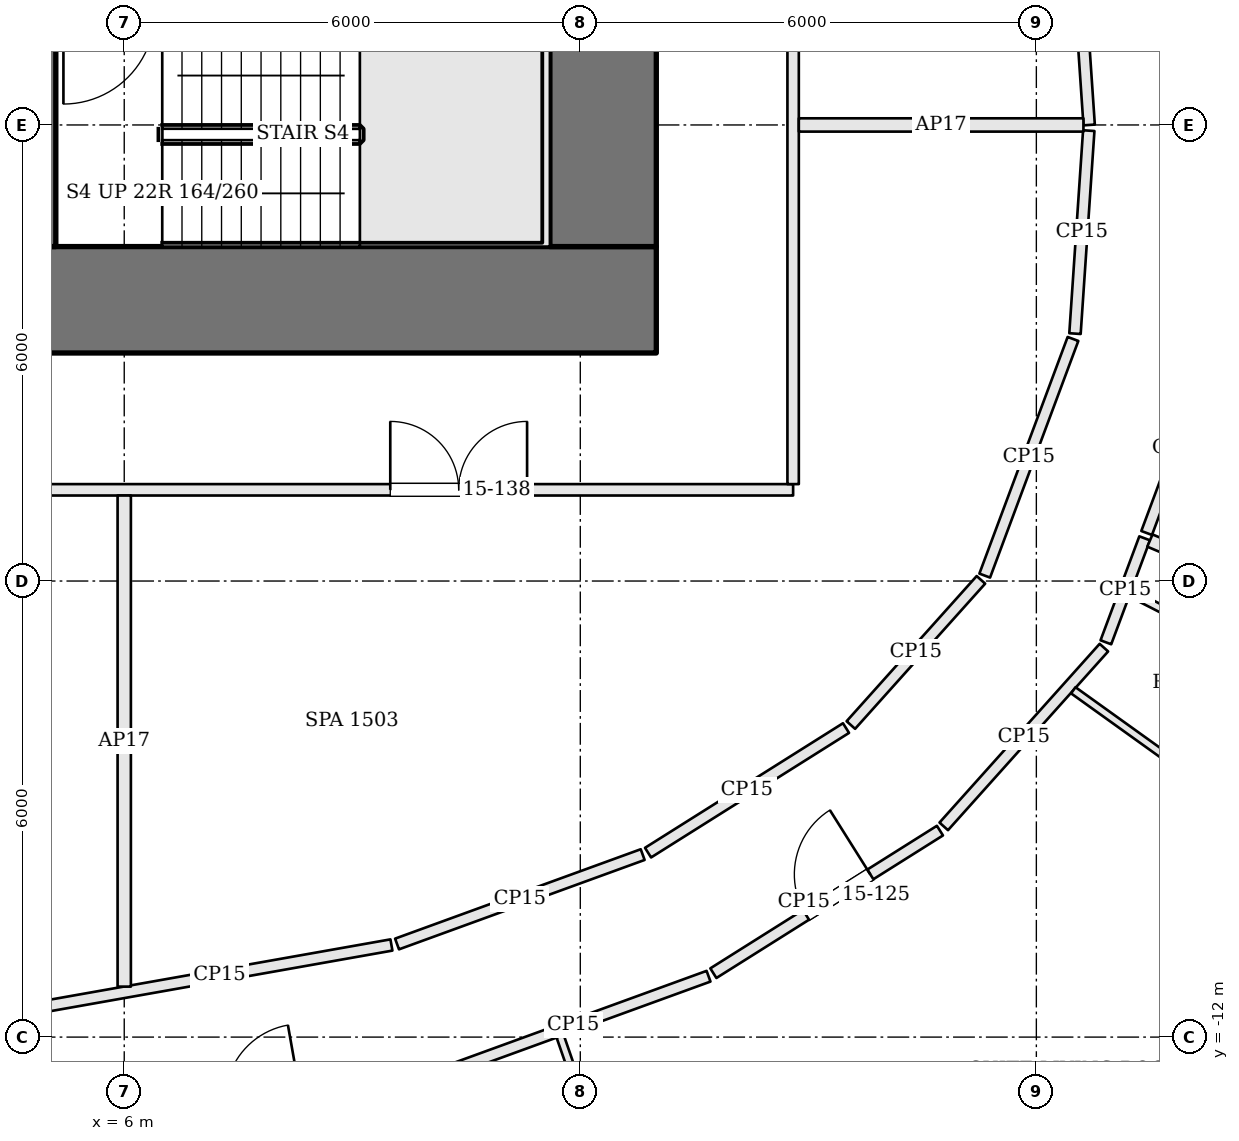
"""IFC4 building model, lengths in metres.
Left out: names, types, materials, properties, quantities, classifications, styles, units other than length and angle.
Written with IfcOpenShell. Run it as: python <this file> out.ifc"""

import sys

from ifc_helpers import new_model, si_unit, direction, frame, frame_2d, origin, place, context, subcontext, project, spatial, rectangle, extrude, element, fill, save


model = new_model("IFC4")
c1 = context("Model", 3, precision=1e-05, world=origin(), true_north=direction((0.0, 1.0)))
c2 = subcontext(c1, "Body", "Model", "MODEL_VIEW")
j1 = project(units=[si_unit("LENGTHUNIT", "METRE"), si_unit("PLANEANGLEUNIT", "RADIAN")], contexts=[c1])
p1 = place(None, origin())
s1 = spatial("IfcSite", under=j1, at=p1, CompositionType="ELEMENT")
p2 = place(p1, origin())
s2 = spatial("IfcBuilding", under=s1, at=p2, CompositionType="ELEMENT")
p3 = place(p2, frame((0.0, 0.0, 69.9)))
s3 = spatial("IfcBuildingStorey", under=s2, at=p3, CompositionType="ELEMENT", Elevation=69.9)
p4 = place(p3, frame((-13.0, -2.3, 0.0), z_axis=(0.0, 0.0, 1.0), x_axis=(1.0, 0.0, 0.0)))
e1 = element("IfcWall", 1, at=p4, inside=s3, PredefinedType="SHEAR", context=c2, shape_type="SweptSolid", body=[
    extrude(rectangle(XDim=26.0, YDim=1.4, at=frame_2d((13.0, 0.0))), origin(), (0.0, 0.0, 1.0), 3.6),
])
p5 = place(p4, frame((8.825, 0.0, 0.0)))
e2 = element("IfcOpeningElement", 2, at=p5, cuts=e1, PredefinedType="OPENING", context=c2, shape_type="SweptSolid", body=[
    extrude(rectangle(XDim=1.0, YDim=2.1, at=frame_2d((0.5, 1.05))), frame((0.0, 0.71, 0.0), z_axis=(0.0, -1.0, 0.0), x_axis=(1.0, 0.0, 0.0)), (0.0, 0.0, 1.0), 1.42),
])
p6 = place(p4, frame((11.025, 0.0, 0.0)))
e3 = element("IfcOpeningElement", 3, at=p6, cuts=e1, PredefinedType="OPENING", context=c2, shape_type="SweptSolid", body=[
    extrude(rectangle(XDim=0.7, YDim=2.1, at=frame_2d((0.35, 1.05))), frame((0.0, 0.71, 0.0), z_axis=(0.0, -1.0, 0.0), x_axis=(1.0, 0.0, 0.0)), (0.0, 0.0, 1.0), 1.42),
])
p7 = place(p4, frame((12.925, 0.0, 0.0)))
e4 = element("IfcOpeningElement", 4, at=p7, cuts=e1, PredefinedType="OPENING", context=c2, shape_type="SweptSolid", body=[
    extrude(rectangle(XDim=1.0, YDim=2.1, at=frame_2d((0.5, 1.05))), frame((0.0, 0.71, 0.0), z_axis=(0.0, -1.0, 0.0), x_axis=(1.0, 0.0, 0.0)), (0.0, 0.0, 1.0), 1.42),
])
p8 = place(p4, frame((15.775, 0.0, 0.0)))
e5 = element("IfcOpeningElement", 5, at=p8, cuts=e1, PredefinedType="OPENING", context=c2, shape_type="SweptSolid", body=[
    extrude(rectangle(XDim=1.0, YDim=2.1, at=frame_2d((0.5, 1.05))), frame((0.0, 0.71, 0.0), z_axis=(0.0, -1.0, 0.0), x_axis=(1.0, 0.0, 0.0)), (0.0, 0.0, 1.0), 1.42),
])
p9 = place(p3, frame((12.3, -1.6, 0.0), z_axis=(0.0, 0.0, 1.0), x_axis=(0.0, 1.0, 0.0)))
e6 = element("IfcWall", 6, at=p9, inside=s3, PredefinedType="SHEAR", context=c2, shape_type="SweptSolid", body=[
    extrude(rectangle(XDim=12.2, YDim=1.4, at=frame_2d((6.1, 0.0))), origin(), (0.0, 0.0, 1.0), 3.6),
])
p10 = place(p9, frame((6.8, 0.0, 0.0)))
e7 = element("IfcOpeningElement", 7, at=p10, cuts=e6, PredefinedType="OPENING", context=c2, shape_type="SweptSolid", body=[
    extrude(rectangle(XDim=1.8, YDim=2.1, at=frame_2d((0.9, 1.05))), frame((0.0, 0.71, 0.0), z_axis=(0.0, -1.0, 0.0), x_axis=(1.0, 0.0, 0.0)), (0.0, 0.0, 1.0), 1.42),
])
p11 = place(p3, frame((4.975, 10.6, 0.0), z_axis=(0.0, 0.0, 1.0), x_axis=(0.0, -1.0, 0.0)))
e8 = element("IfcWall", 8, at=p11, inside=s3, PredefinedType="SOLIDWALL", context=c2, shape_type="SweptSolid", body=[
    extrude(rectangle(XDim=12.2, YDim=0.25, at=frame_2d((6.1, 0.0))), origin(), (0.0, 0.0, 1.0), 3.4),
])
p12 = place(p11, frame((4.65, 0.0, 0.0)))
e9 = element("IfcOpeningElement", 9, at=p12, cuts=e8, PredefinedType="OPENING", context=c2, shape_type="SweptSolid", body=[
    extrude(rectangle(XDim=1.2, YDim=2.1, at=frame_2d((0.6, 1.05))), frame((0.0, 0.135, 0.0), z_axis=(0.0, -1.0, 0.0), x_axis=(1.0, 0.0, 0.0)), (0.0, 0.0, 1.0), 0.27),
])
p13 = place(p3, frame((10.128, -12.494, 0.0), z_axis=(0.0, 0.0, 1.0), x_axis=(0.939720005412, 0.341944895309, 0.0)))
e10 = element("IfcWall", 10, at=p13, inside=s3, PredefinedType="PARTITIONING", context=c2, shape_type="SweptSolid", body=[
    extrude(rectangle(XDim=3.788, YDim=0.15, at=frame_2d((1.894, 0.0))), origin(), (0.0, 0.0, 1.0), 2.68),
])
p14 = place(p3, frame((13.751, -11.159, 0.0), z_axis=(0.0, 0.0, 1.0), x_axis=(0.846413381026, 0.532526420396, 0.0)))
e11 = element("IfcWall", 11, at=p14, inside=s3, PredefinedType="PARTITIONING", context=c2, shape_type="SweptSolid", body=[
    extrude(rectangle(XDim=3.522, YDim=0.15, at=frame_2d((1.761, 0.0))), origin(), (0.0, 0.0, 1.0), 2.68),
])
p15 = place(p14, frame((1.44, 0.0, 0.0)))
e12 = element("IfcOpeningElement", 12, at=p15, cuts=e11, PredefinedType="OPENING", context=c2, shape_type="SweptSolid", body=[
    extrude(rectangle(XDim=1.0, YDim=2.1, at=frame_2d((0.5, 1.05))), frame((0.0, 0.085, 0.0), z_axis=(0.0, -1.0, 0.0), x_axis=(1.0, 0.0, 0.0)), (0.0, 0.0, 1.0), 0.17),
])
p16 = place(p3, frame((16.781, -9.228, 0.0), z_axis=(0.0, 0.0, 1.0), x_axis=(0.667305516611, 0.744784094554, 0.0)))
e13 = element("IfcWall", 13, at=p16, inside=s3, PredefinedType="PARTITIONING", context=c2, shape_type="SweptSolid", body=[
    extrude(rectangle(XDim=3.157, YDim=0.15, at=frame_2d((1.579, 0.0))), origin(), (0.0, 0.0, 1.0), 2.68),
])
p17 = place(p3, frame((18.915, -6.806, 0.0), z_axis=(0.0, 0.0, 1.0), x_axis=(0.349345122546, 0.936994122368, 0.0)))
e14 = element("IfcWall", 14, at=p17, inside=s3, PredefinedType="PARTITIONING", context=c2, shape_type="SweptSolid", body=[
    extrude(rectangle(XDim=1.46, YDim=0.15, at=frame_2d((0.73, 0.0))), origin(), (0.0, 0.0, 1.0), 2.68),
])
p18 = place(p3, frame((29.139, -9.557, 0.0), z_axis=(0.0, 0.0, 1.0), x_axis=(-0.920644988054, 0.390400827318, 0.0)))
e15 = element("IfcWall", 15, at=p18, inside=s3, PredefinedType="PARTITIONING", context=c2, shape_type="SweptSolid", body=[
    extrude(rectangle(XDim=10.477, YDim=0.175, at=frame_2d((5.238, 0.0))), origin(), (0.0, 0.0, 1.0), 2.68),
])
p19 = place(p3, frame((19.451, -5.368, 0.0), z_axis=(0.0, 0.0, 1.0), x_axis=(0.349432605922, 0.936961500766, 0.0)))
e16 = element("IfcWall", 16, at=p19, inside=s3, PredefinedType="PARTITIONING", context=c2, shape_type="SweptSolid", body=[
    extrude(rectangle(XDim=2.39, YDim=0.15, at=frame_2d((1.195, 0.0))), origin(), (0.0, 0.0, 1.0), 2.68),
])
p20 = place(p3, frame((18.508, 2.742, 0.0), z_axis=(0.0, 0.0, 1.0), x_axis=(0.067774714774, -0.997700650515, 0.0)))
e17 = element("IfcWall", 17, at=p20, inside=s3, PredefinedType="PARTITIONING", context=c2, shape_type="SweptSolid", body=[
    extrude(rectangle(XDim=2.749, YDim=0.15, at=frame_2d((1.374, 0.0))), origin(), (0.0, 0.0, 1.0), 2.68),
])
p21 = place(p3, frame((18.689, -0.075, 0.0), z_axis=(0.0, 0.0, 1.0), x_axis=(-0.067687508044, -0.997706570718, 0.0)))
e18 = element("IfcWall", 18, at=p21, inside=s3, PredefinedType="PARTITIONING", context=c2, shape_type="SweptSolid", body=[
    extrude(rectangle(XDim=2.676, YDim=0.15, at=frame_2d((1.338, 0.0))), origin(), (0.0, 0.0, 1.0), 2.68),
])
p22 = place(p3, frame((18.482, -2.815, 0.0), z_axis=(0.0, 0.0, 1.0), x_axis=(-0.349448047934, -0.936955741642, 0.0)))
e19 = element("IfcWall", 19, at=p22, inside=s3, PredefinedType="PARTITIONING", context=c2, shape_type="SweptSolid", body=[
    extrude(rectangle(XDim=3.323, YDim=0.15, at=frame_2d((1.661, 0.0))), origin(), (0.0, 0.0, 1.0), 2.68),
])
p23 = place(p3, frame((17.271, -5.984, 0.0), z_axis=(0.0, 0.0, 1.0), x_axis=(-0.667301130907, -0.744788023997, 0.0)))
e20 = element("IfcWall", 20, at=p23, inside=s3, PredefinedType="PARTITIONING", context=c2, shape_type="SweptSolid", body=[
    extrude(rectangle(XDim=2.565, YDim=0.15, at=frame_2d((1.282, 0.0))), origin(), (0.0, 0.0, 1.0), 2.68),
])
p24 = place(p3, frame((15.496, -7.934, 0.0), z_axis=(0.0, 0.0, 1.0), x_axis=(-0.846358667139, -0.532613374371, 0.0)))
e21 = element("IfcWall", 21, at=p24, inside=s3, PredefinedType="PARTITIONING", context=c2, shape_type="SweptSolid", body=[
    extrude(rectangle(XDim=3.078, YDim=0.15, at=frame_2d((1.539, 0.0))), origin(), (0.0, 0.0, 1.0), 2.68),
])
p25 = place(p3, frame((12.821, -9.599, 0.0), z_axis=(0.0, 0.0, 1.0), x_axis=(-0.939712560326, -0.341965354921, 0.0)))
e22 = element("IfcWall", 22, at=p25, inside=s3, PredefinedType="PARTITIONING", context=c2, shape_type="SweptSolid", body=[
    extrude(rectangle(XDim=3.439, YDim=0.15, at=frame_2d((1.719, 0.0))), origin(), (0.0, 0.0, 1.0), 2.68),
])
p26 = place(p3, frame((9.515, -10.788, 0.0), z_axis=(0.0, 0.0, 1.0), x_axis=(-0.984662912103, -0.174467617423, 0.0)))
e23 = element("IfcWall", 23, at=p26, inside=s3, PredefinedType="PARTITIONING", context=c2, shape_type="SweptSolid", body=[
    extrude(rectangle(XDim=4.593, YDim=0.15, at=frame_2d((2.296, 0.0))), origin(), (0.0, 0.0, 1.0), 2.68),
])
p27 = place(p3, frame((-14.725, -4.8, 0.0), z_axis=(0.0, 0.0, 1.0), x_axis=(1.0, 0.0, 0.0)))
e24 = element("IfcWall", 24, at=p27, inside=s3, PredefinedType="PARTITIONING", context=c2, shape_type="SweptSolid", body=[
    extrude(rectangle(XDim=29.525, YDim=0.15, at=frame_2d((14.763, 0.0))), origin(), (0.0, 0.0, 1.0), 2.68),
])
p28 = place(p27, frame((3.425, 0.0, 0.0)))
e25 = element("IfcOpeningElement", 25, at=p28, cuts=e24, PredefinedType="OPENING", context=c2, shape_type="SweptSolid", body=[
    extrude(rectangle(XDim=1.8, YDim=2.1, at=frame_2d((0.9, 1.05))), frame((0.0, 0.085, 0.0), z_axis=(0.0, -1.0, 0.0), x_axis=(1.0, 0.0, 0.0)), (0.0, 0.0, 1.0), 0.17),
])
p29 = place(p27, frame((13.825, 0.0, 0.0)))
e26 = element("IfcOpeningElement", 26, at=p29, cuts=e24, PredefinedType="OPENING", context=c2, shape_type="SweptSolid", body=[
    extrude(rectangle(XDim=1.8, YDim=2.1, at=frame_2d((0.9, 1.05))), frame((0.0, 0.085, 0.0), z_axis=(0.0, -1.0, 0.0), x_axis=(1.0, 0.0, 0.0)), (0.0, 0.0, 1.0), 0.17),
])
p30 = place(p27, frame((24.225, 0.0, 0.0)))
e27 = element("IfcOpeningElement", 27, at=p30, cuts=e24, PredefinedType="OPENING", context=c2, shape_type="SweptSolid", body=[
    extrude(rectangle(XDim=1.8, YDim=2.1, at=frame_2d((0.9, 1.05))), frame((0.0, 0.085, 0.0), z_axis=(0.0, -1.0, 0.0), x_axis=(1.0, 0.0, 0.0)), (0.0, 0.0, 1.0), 0.17),
])
p31 = place(p3, frame((14.8, -4.725, 0.0), z_axis=(0.0, 0.0, 1.0), x_axis=(0.0, 1.0, 0.0)))
e28 = element("IfcWall", 28, at=p31, inside=s3, PredefinedType="PARTITIONING", context=c2, shape_type="SweptSolid", body=[
    extrude(rectangle(XDim=13.15, YDim=0.15, at=frame_2d((6.575, 0.0))), origin(), (0.0, 0.0, 1.0), 2.68),
])
p32 = place(p31, frame((8.438, 0.0, 0.0)))
e29 = element("IfcOpeningElement", 29, at=p32, cuts=e28, PredefinedType="OPENING", context=c2, shape_type="SweptSolid", body=[
    extrude(rectangle(XDim=1.0, YDim=2.1, at=frame_2d((0.5, 1.05))), frame((0.0, 0.085, 0.0), z_axis=(0.0, -1.0, 0.0), x_axis=(1.0, 0.0, 0.0)), (0.0, 0.0, 1.0), 0.17),
])
p33 = place(p3, frame((14.603, -20.272, 0.0), z_axis=(0.0, 0.0, 1.0), x_axis=(-0.327253103395, 0.944936720801, 0.0)))
e30 = element("IfcWall", 30, at=p33, inside=s3, PredefinedType="PARTITIONING", context=c2, shape_type="SweptSolid", body=[
    extrude(rectangle(XDim=8.765, YDim=0.1, at=frame_2d((4.383, 0.0))), origin(), (0.0, 0.0, 1.0), 2.898),
])
p34 = place(p33, frame((4.69, 0.0, 0.0)))
e31 = element("IfcOpeningElement", 31, at=p34, cuts=e30, PredefinedType="OPENING", context=c2, shape_type="SweptSolid", body=[
    extrude(rectangle(XDim=0.9, YDim=2.4, at=frame_2d((0.45, 1.2))), frame((0.0, 0.06, 0.0), z_axis=(0.0, -1.0, 0.0), x_axis=(1.0, 0.0, 0.0)), (0.0, 0.0, 1.0), 0.12),
])
p35 = place(p3, frame((27.033, -13.565, 0.0), z_axis=(0.0, 0.0, 1.0), x_axis=(-0.812696934536, 0.582686616112, 0.0)))
e32 = element("IfcWall", 32, at=p35, inside=s3, PredefinedType="PARTITIONING", context=c2, shape_type="SweptSolid", body=[
    extrude(rectangle(XDim=10.517, YDim=0.1, at=frame_2d((5.258, 0.0))), origin(), (0.0, 0.0, 1.0), 2.898),
])
p36 = place(p35, frame((6.442, 0.0, 0.0)))
e33 = element("IfcOpeningElement", 33, at=p36, cuts=e32, PredefinedType="OPENING", context=c2, shape_type="SweptSolid", body=[
    extrude(rectangle(XDim=0.9, YDim=2.4, at=frame_2d((0.45, 1.2))), frame((0.0, 0.06, 0.0), z_axis=(0.0, -1.0, 0.0), x_axis=(1.0, 0.0, 0.0)), (0.0, 0.0, 1.0), 0.12),
])
p37 = place(p3, frame((19.237, -6.156, 0.0), z_axis=(0.0, 0.0, 1.0), x_axis=(0.890073027503, -0.455817952379, 0.0)))
e34 = element("IfcWall", 34, at=p37, inside=s3, PredefinedType="PARTITIONING", context=c2, shape_type="SweptSolid", body=[
    extrude(rectangle(XDim=2.525, YDim=0.1, at=frame_2d((1.262, 0.0))), origin(), (0.0, 0.0, 1.0), 2.898),
])
p38 = place(p37, frame((1.2, 0.0, 0.0)))
e35 = element("IfcOpeningElement", 35, at=p38, cuts=e34, PredefinedType="OPENING", context=c2, shape_type="SweptSolid", body=[
    extrude(rectangle(XDim=0.8, YDim=2.1, at=frame_2d((0.4, 1.05))), frame((0.0, 0.06, 0.0), z_axis=(0.0, -1.0, 0.0), x_axis=(1.0, 0.0, 0.0)), (0.0, 0.0, 1.0), 0.12),
])
p39 = place(p3, frame((6.0, -11.336, 0.0), z_axis=(0.0, 0.0, 1.0), x_axis=(0.0, 1.0, 0.0)))
e36 = element("IfcWall", 36, at=p39, inside=s3, PredefinedType="PARTITIONING", context=c2, shape_type="SweptSolid", body=[
    extrude(rectangle(XDim=6.461, YDim=0.175, at=frame_2d((3.23, 0.0))), origin(), (0.0, 0.0, 1.0), 2.68),
])
p40 = place(p3, frame((14.875, 0.0, 0.0), z_axis=(0.0, 0.0, 1.0), x_axis=(1.0, 0.0, 0.0)))
e37 = element("IfcWall", 37, at=p40, inside=s3, PredefinedType="PARTITIONING", context=c2, shape_type="SweptSolid", body=[
    extrude(rectangle(XDim=3.744, YDim=0.175, at=frame_2d((1.872, 0.0))), origin(), (0.0, 0.0, 1.0), 2.68),
])
p41 = place(p15, origin())
e38 = element("IfcDoor", 38, at=p41, inside=s3, OperationType="SINGLE_SWING_RIGHT", PredefinedType="DOOR", context=c2, shape_type="SweptSolid", body=[
    extrude(rectangle(XDim=1.0, YDim=2.1, at=frame_2d((0.5, 1.05))), frame((0.0, 0.025, 0.0), z_axis=(0.0, -1.0, 0.0), x_axis=(1.0, 0.0, 0.0)), (0.0, 0.0, 1.0), 0.05),
])
fill(e12, e38)
p42 = place(p30, origin())
e39 = element("IfcDoor", 39, at=p42, inside=s3, OperationType="DOUBLE_DOOR_SINGLE_SWING", PredefinedType="DOOR", context=c2, shape_type="SweptSolid", body=[
    extrude(rectangle(XDim=1.8, YDim=2.1, at=frame_2d((0.9, 1.05))), frame((0.0, 0.025, 0.0), z_axis=(0.0, -1.0, 0.0), x_axis=(1.0, 0.0, 0.0)), (0.0, 0.0, 1.0), 0.05),
])
fill(e27, e39)
save(model, sys.argv[1])
